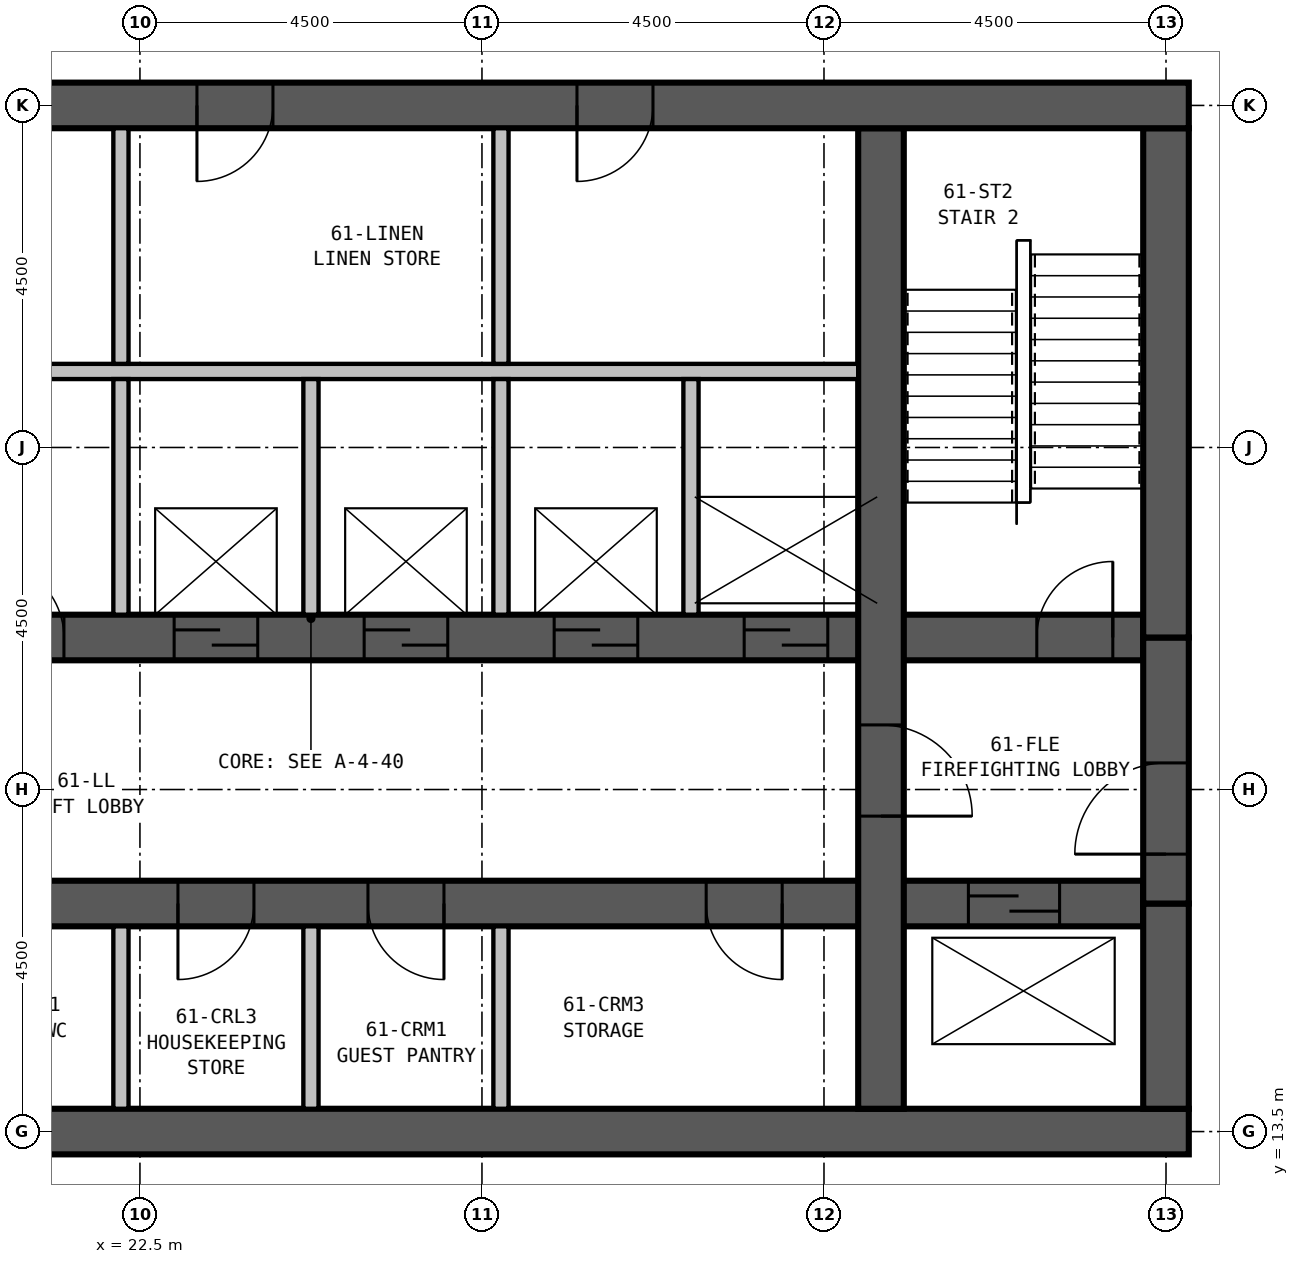
"""IFC4 building model, lengths in metres.
Left out: names, types, materials, properties, quantities, classifications, styles, units other than length and angle.
Written with IfcOpenShell. Run it as: python <this file> out.ifc"""

import sys

from ifc_helpers import new_model, si_unit, direction, frame, frame_2d, origin, place, context, subcontext, project, spatial, rectangle, extrude, element, fill, save


model = new_model("IFC4")
c1 = context("Model", 3, precision=1e-05, world=origin(), true_north=direction((0.0, 1.0)))
c2 = subcontext(c1, "Body", "Model", "MODEL_VIEW")
j1 = project(units=[si_unit("LENGTHUNIT", "METRE"), si_unit("PLANEANGLEUNIT", "RADIAN")], contexts=[c1])
p1 = place(None, origin())
s1 = spatial("IfcSite", under=j1, at=p1, CompositionType="ELEMENT")
p2 = place(p1, origin())
s2 = spatial("IfcBuilding", under=s1, at=p2, CompositionType="ELEMENT")
p3 = place(p2, frame((0.0, 0.0, 236.9)))
s3 = spatial("IfcBuildingStorey", under=s2, at=p3, CompositionType="ELEMENT", Elevation=236.9)
p4 = place(p3, frame((13.2, 13.5, 0.0), z_axis=(0.0, 0.0, 1.0), x_axis=(1.0, 0.0, 0.0)))
e1 = element("IfcWall", 1, at=p4, inside=s3, PredefinedType="SHEAR", context=c2, shape_type="SweptSolid", body=[
    extrude(rectangle(XDim=23.1, YDim=0.6, at=frame_2d((11.55, 0.0))), origin(), (0.0, 0.0, 1.0), 3.9),
])
p5 = place(p3, frame((36.3, 27.0, 0.0), z_axis=(0.0, 0.0, 1.0), x_axis=(-1.0, 0.0, 0.0)))
e2 = element("IfcWall", 2, at=p5, inside=s3, PredefinedType="SHEAR", context=c2, shape_type="SweptSolid", body=[
    extrude(rectangle(XDim=23.45, YDim=0.6, at=frame_2d((11.725, 0.0))), origin(), (0.0, 0.0, 1.0), 3.9),
])
p6 = place(p5, frame((17.05, 0.0, 0.0)))
e3 = element("IfcOpeningElement", 3, at=p6, cuts=e2, PredefinedType="OPENING", context=c2, shape_type="SweptSolid", body=[
    extrude(rectangle(XDim=1.0, YDim=2.1, at=frame_2d((0.5, 1.05))), frame((0.0, 0.31, 0.0), z_axis=(0.0, -1.0, 0.0), x_axis=(1.0, 0.0, 0.0)), (0.0, 0.0, 1.0), 0.62),
])
p7 = place(p5, frame((12.05, 0.0, 0.0)))
e4 = element("IfcOpeningElement", 4, at=p7, cuts=e2, PredefinedType="OPENING", context=c2, shape_type="SweptSolid", body=[
    extrude(rectangle(XDim=1.0, YDim=2.1, at=frame_2d((0.5, 1.05))), frame((0.0, 0.31, 0.0), z_axis=(0.0, -1.0, 0.0), x_axis=(1.0, 0.0, 0.0)), (0.0, 0.0, 1.0), 0.62),
])
p8 = place(p5, frame((7.05, 0.0, 0.0)))
e5 = element("IfcOpeningElement", 5, at=p8, cuts=e2, PredefinedType="OPENING", context=c2, shape_type="SweptSolid", body=[
    extrude(rectangle(XDim=1.0, YDim=2.1, at=frame_2d((0.5, 1.05))), frame((0.0, 0.31, 0.0), z_axis=(0.0, -1.0, 0.0), x_axis=(1.0, 0.0, 0.0)), (0.0, 0.0, 1.0), 0.62),
])
p9 = place(p3, frame((32.25, 13.8, 0.0), z_axis=(0.0, 0.0, 1.0), x_axis=(0.0, 1.0, 0.0)))
e6 = element("IfcWall", 6, at=p9, inside=s3, PredefinedType="SHEAR", context=c2, shape_type="SweptSolid", body=[
    extrude(rectangle(XDim=12.9, YDim=0.6, at=frame_2d((6.45, 0.0))), origin(), (0.0, 0.0, 1.0), 3.9),
])
p10 = place(p9, frame((5.05, 0.0, 0.0), z_axis=(0.0, 0.0, 1.0), x_axis=(-1.0, 0.0, 0.0)))
e7 = element("IfcOpeningElement", 7, at=p10, cuts=e6, PredefinedType="OPENING", context=c2, shape_type="SweptSolid", body=[
    extrude(rectangle(XDim=1.2, YDim=2.1, at=frame_2d((0.6, 1.05))), frame((0.0, 0.31, 0.0), z_axis=(0.0, -1.0, 0.0), x_axis=(1.0, 0.0, 0.0)), (0.0, 0.0, 1.0), 0.62),
])
p11 = place(p3, frame((13.8, 16.5, 0.0), z_axis=(0.0, 0.0, 1.0), x_axis=(1.0, 0.0, 0.0)))
e8 = element("IfcWall", 8, at=p11, inside=s3, PredefinedType="SHEAR", context=c2, shape_type="SweptSolid", body=[
    extrude(rectangle(XDim=21.9, YDim=0.6, at=frame_2d((10.95, 0.0))), origin(), (0.0, 0.0, 1.0), 3.9),
])
p12 = place(p11, frame((5.75, 0.0, 0.0), z_axis=(0.0, 0.0, 1.0), x_axis=(-1.0, 0.0, 0.0)))
e9 = element("IfcOpeningElement", 9, at=p12, cuts=e8, PredefinedType="OPENING", context=c2, shape_type="SweptSolid", body=[
    extrude(rectangle(XDim=1.0, YDim=2.1, at=frame_2d((0.5, 1.05))), frame((0.0, 0.31, 0.0), z_axis=(0.0, -1.0, 0.0), x_axis=(1.0, 0.0, 0.0)), (0.0, 0.0, 1.0), 0.62),
])
p13 = place(p11, frame((10.2, 0.0, 0.0), z_axis=(0.0, 0.0, 1.0), x_axis=(-1.0, 0.0, 0.0)))
e10 = element("IfcOpeningElement", 10, at=p13, cuts=e8, PredefinedType="OPENING", context=c2, shape_type="SweptSolid", body=[
    extrude(rectangle(XDim=1.0, YDim=2.1, at=frame_2d((0.5, 1.05))), frame((0.0, 0.31, 0.0), z_axis=(0.0, -1.0, 0.0), x_axis=(1.0, 0.0, 0.0)), (0.0, 0.0, 1.0), 0.62),
])
p14 = place(p11, frame((12.7, 0.0, 0.0), z_axis=(0.0, 0.0, 1.0), x_axis=(-1.0, 0.0, 0.0)))
e11 = element("IfcOpeningElement", 11, at=p14, cuts=e8, PredefinedType="OPENING", context=c2, shape_type="SweptSolid", body=[
    extrude(rectangle(XDim=1.0, YDim=2.1, at=frame_2d((0.5, 1.05))), frame((0.0, 0.31, 0.0), z_axis=(0.0, -1.0, 0.0), x_axis=(1.0, 0.0, 0.0)), (0.0, 0.0, 1.0), 0.62),
])
p15 = place(p11, frame((17.15, 0.0, 0.0), z_axis=(0.0, 0.0, 1.0), x_axis=(-1.0, 0.0, 0.0)))
e12 = element("IfcOpeningElement", 12, at=p15, cuts=e8, PredefinedType="OPENING", context=c2, shape_type="SweptSolid", body=[
    extrude(rectangle(XDim=1.0, YDim=2.1, at=frame_2d((0.5, 1.05))), frame((0.0, 0.31, 0.0), z_axis=(0.0, -1.0, 0.0), x_axis=(1.0, 0.0, 0.0)), (0.0, 0.0, 1.0), 0.62),
])
p16 = place(p11, frame((0.6, 0.0, 0.0)))
e13 = element("IfcOpeningElement", 13, at=p16, cuts=e8, PredefinedType="OPENING", context=c2, shape_type="SweptSolid", body=[
    extrude(rectangle(XDim=1.2, YDim=2.1, at=frame_2d((0.6, 1.05))), frame((0.0, 0.31, 0.0), z_axis=(0.0, -1.0, 0.0), x_axis=(1.0, 0.0, 0.0)), (0.0, 0.0, 1.0), 0.62),
])
p17 = place(p11, frame((19.6, 0.0, 0.0)))
e14 = element("IfcOpeningElement", 14, at=p17, cuts=e8, PredefinedType="OPENING", context=c2, shape_type="SweptSolid", body=[
    extrude(rectangle(XDim=1.2, YDim=2.1, at=frame_2d((0.6, 1.05))), frame((0.0, 0.31, 0.0), z_axis=(0.0, -1.0, 0.0), x_axis=(1.0, 0.0, 0.0)), (0.0, 0.0, 1.0), 0.62),
])
p18 = place(p3, frame((13.8, 20.0, 0.0), z_axis=(0.0, 0.0, 1.0), x_axis=(1.0, 0.0, 0.0)))
e15 = element("IfcWall", 15, at=p18, inside=s3, PredefinedType="SHEAR", context=c2, shape_type="SweptSolid", body=[
    extrude(rectangle(XDim=21.9, YDim=0.6, at=frame_2d((10.95, 0.0))), origin(), (0.0, 0.0, 1.0), 3.9),
])
p19 = place(p18, frame((0.5, 0.0, 0.0)))
e16 = element("IfcOpeningElement", 16, at=p19, cuts=e15, PredefinedType="OPENING", context=c2, shape_type="SweptSolid", body=[
    extrude(rectangle(XDim=1.0, YDim=2.1, at=frame_2d((0.5, 1.05))), frame((0.0, 0.31, 0.0), z_axis=(0.0, -1.0, 0.0), x_axis=(1.0, 0.0, 0.0)), (0.0, 0.0, 1.0), 0.62),
])
p20 = place(p18, frame((20.5, 0.0, 0.0)))
e17 = element("IfcOpeningElement", 17, at=p20, cuts=e15, PredefinedType="OPENING", context=c2, shape_type="SweptSolid", body=[
    extrude(rectangle(XDim=1.0, YDim=2.1, at=frame_2d((0.5, 1.05))), frame((0.0, 0.31, 0.0), z_axis=(0.0, -1.0, 0.0), x_axis=(1.0, 0.0, 0.0)), (0.0, 0.0, 1.0), 0.62),
])
p21 = place(p18, frame((9.15, 0.0, 0.0)))
e18 = element("IfcOpeningElement", 18, at=p21, cuts=e15, PredefinedType="OPENING", context=c2, shape_type="SweptSolid", body=[
    extrude(rectangle(XDim=1.1, YDim=2.1, at=frame_2d((0.55, 1.05))), frame((0.0, 0.31, 0.0), z_axis=(0.0, -1.0, 0.0), x_axis=(1.0, 0.0, 0.0)), (0.0, 0.0, 1.0), 0.62),
])
p22 = place(p18, frame((11.65, 0.0, 0.0)))
e19 = element("IfcOpeningElement", 19, at=p22, cuts=e15, PredefinedType="OPENING", context=c2, shape_type="SweptSolid", body=[
    extrude(rectangle(XDim=1.1, YDim=2.1, at=frame_2d((0.55, 1.05))), frame((0.0, 0.31, 0.0), z_axis=(0.0, -1.0, 0.0), x_axis=(1.0, 0.0, 0.0)), (0.0, 0.0, 1.0), 0.62),
])
p23 = place(p18, frame((14.15, 0.0, 0.0)))
e20 = element("IfcOpeningElement", 20, at=p23, cuts=e15, PredefinedType="OPENING", context=c2, shape_type="SweptSolid", body=[
    extrude(rectangle(XDim=1.1, YDim=2.1, at=frame_2d((0.55, 1.05))), frame((0.0, 0.31, 0.0), z_axis=(0.0, -1.0, 0.0), x_axis=(1.0, 0.0, 0.0)), (0.0, 0.0, 1.0), 0.62),
])
p24 = place(p18, frame((16.65, 0.0, 0.0)))
e21 = element("IfcOpeningElement", 21, at=p24, cuts=e15, PredefinedType="OPENING", context=c2, shape_type="SweptSolid", body=[
    extrude(rectangle(XDim=1.1, YDim=2.1, at=frame_2d((0.55, 1.05))), frame((0.0, 0.31, 0.0), z_axis=(0.0, -1.0, 0.0), x_axis=(1.0, 0.0, 0.0)), (0.0, 0.0, 1.0), 0.62),
])
p25 = place(p18, frame((5.75, 0.0, 0.0), z_axis=(0.0, 0.0, 1.0), x_axis=(-1.0, 0.0, 0.0)))
e22 = element("IfcOpeningElement", 22, at=p25, cuts=e15, PredefinedType="OPENING", context=c2, shape_type="SweptSolid", body=[
    extrude(rectangle(XDim=1.0, YDim=2.1, at=frame_2d((0.5, 1.05))), frame((0.0, 0.31, 0.0), z_axis=(0.0, -1.0, 0.0), x_axis=(1.0, 0.0, 0.0)), (0.0, 0.0, 1.0), 0.62),
])
p26 = place(p18, frame((6.7, 0.0, 0.0)))
e23 = element("IfcOpeningElement", 23, at=p26, cuts=e15, PredefinedType="OPENING", context=c2, shape_type="SweptSolid", body=[
    extrude(rectangle(XDim=1.0, YDim=2.1, at=frame_2d((0.5, 1.05))), frame((0.0, 0.31, 0.0), z_axis=(0.0, -1.0, 0.0), x_axis=(1.0, 0.0, 0.0)), (0.0, 0.0, 1.0), 0.62),
])
p27 = place(p3, frame((36.0, 13.8, 0.0), z_axis=(0.0, 0.0, 1.0), x_axis=(0.0, 1.0, 0.0)))
e24 = element("IfcWall", 24, at=p27, inside=s3, PredefinedType="SHEAR", context=c2, shape_type="SweptSolid", body=[
    extrude(rectangle(XDim=2.7, YDim=0.6, at=frame_2d((1.35, 0.0))), origin(), (0.0, 0.0, 1.0), 3.9),
])
p28 = place(p3, frame((36.0, 16.5, 0.0), z_axis=(0.0, 0.0, 1.0), x_axis=(0.0, 1.0, 0.0)))
e25 = element("IfcWall", 25, at=p28, inside=s3, PredefinedType="SHEAR", context=c2, shape_type="SweptSolid", body=[
    extrude(rectangle(XDim=3.5, YDim=0.6, at=frame_2d((1.75, 0.0))), origin(), (0.0, 0.0, 1.0), 3.9),
])
p29 = place(p28, frame((0.65, 0.0, 0.0)))
e26 = element("IfcOpeningElement", 26, at=p29, cuts=e25, PredefinedType="OPENING", context=c2, shape_type="SweptSolid", body=[
    extrude(rectangle(XDim=1.2, YDim=2.1, at=frame_2d((0.6, 1.05))), frame((0.0, 0.31, 0.0), z_axis=(0.0, -1.0, 0.0), x_axis=(1.0, 0.0, 0.0)), (0.0, 0.0, 1.0), 0.62),
])
p30 = place(p3, frame((36.0, 20.0, 0.0), z_axis=(0.0, 0.0, 1.0), x_axis=(0.0, 1.0, 0.0)))
e27 = element("IfcWall", 27, at=p30, inside=s3, PredefinedType="SHEAR", context=c2, shape_type="SweptSolid", body=[
    extrude(rectangle(XDim=6.7, YDim=0.6, at=frame_2d((3.35, 0.0))), origin(), (0.0, 0.0, 1.0), 3.9),
])
p31 = place(p3, frame((22.25, 13.8, 0.0), z_axis=(0.0, 0.0, 1.0), x_axis=(0.0, 1.0, 0.0)))
e28 = element("IfcWall", 28, at=p31, inside=s3, PredefinedType="PARTITIONING", context=c2, shape_type="SweptSolid", body=[
    extrude(rectangle(XDim=2.4, YDim=0.2, at=frame_2d((1.2, 0.0))), origin(), (0.0, 0.0, 1.0), 3.65),
])
p32 = place(p3, frame((22.25, 20.3, 0.0), z_axis=(0.0, 0.0, 1.0), x_axis=(0.0, 1.0, 0.0)))
e29 = element("IfcWall", 29, at=p32, inside=s3, PredefinedType="PARTITIONING", context=c2, shape_type="SweptSolid", body=[
    extrude(rectangle(XDim=3.1, YDim=0.2, at=frame_2d((1.55, 0.0))), origin(), (0.0, 0.0, 1.0), 3.65),
])
p33 = place(p3, frame((24.75, 13.8, 0.0), z_axis=(0.0, 0.0, 1.0), x_axis=(0.0, 1.0, 0.0)))
e30 = element("IfcWall", 30, at=p33, inside=s3, PredefinedType="PARTITIONING", context=c2, shape_type="SweptSolid", body=[
    extrude(rectangle(XDim=2.4, YDim=0.2, at=frame_2d((1.2, 0.0))), origin(), (0.0, 0.0, 1.0), 3.65),
])
p34 = place(p3, frame((24.75, 20.3, 0.0), z_axis=(0.0, 0.0, 1.0), x_axis=(0.0, 1.0, 0.0)))
e31 = element("IfcWall", 31, at=p34, inside=s3, PredefinedType="PARTITIONING", context=c2, shape_type="SweptSolid", body=[
    extrude(rectangle(XDim=3.1, YDim=0.2, at=frame_2d((1.55, 0.0))), origin(), (0.0, 0.0, 1.0), 3.65),
])
p35 = place(p3, frame((27.25, 13.8, 0.0), z_axis=(0.0, 0.0, 1.0), x_axis=(0.0, 1.0, 0.0)))
e32 = element("IfcWall", 32, at=p35, inside=s3, PredefinedType="PARTITIONING", context=c2, shape_type="SweptSolid", body=[
    extrude(rectangle(XDim=2.4, YDim=0.2, at=frame_2d((1.2, 0.0))), origin(), (0.0, 0.0, 1.0), 3.65),
])
for number, where, z_axis, x_axis in (
    (33, (27.25, 20.3, 0.0), (0.0, 0.0, 1.0), (0.0, 1.0, 0.0)),
    (34, (29.75, 20.3, 0.0), (0.0, 0.0, 1.0), (0.0, 1.0, 0.0)),
):
    element("IfcWall", number, at=place(p3, frame(where, z_axis=z_axis, x_axis=x_axis)), inside=s3, PredefinedType="PARTITIONING", context=c2, shape_type="SweptSolid", body=[
        extrude(rectangle(XDim=3.1, YDim=0.2, at=frame_2d((1.55, 0.0))), origin(), (0.0, 0.0, 1.0), 3.65),
    ])
p36 = place(p3, frame((17.55, 23.5, 0.0), z_axis=(0.0, 0.0, 1.0), x_axis=(1.0, 0.0, 0.0)))
e35 = element("IfcWall", 35, at=p36, inside=s3, PredefinedType="PARTITIONING", context=c2, shape_type="SweptSolid", body=[
    extrude(rectangle(XDim=14.4, YDim=0.2, at=frame_2d((7.2, 0.0))), origin(), (0.0, 0.0, 1.0), 3.65),
])
p37 = place(p36, frame((0.45, 0.0, 0.0)))
e36 = element("IfcOpeningElement", 36, at=p37, cuts=e35, PredefinedType="OPENING", context=c2, shape_type="SweptSolid", body=[
    extrude(rectangle(XDim=1.0, YDim=2.1, at=frame_2d((0.5, 1.05))), frame((0.0, 0.11, 0.0), z_axis=(0.0, -1.0, 0.0), x_axis=(1.0, 0.0, 0.0)), (0.0, 0.0, 1.0), 0.22),
])
for number, where, z_axis, x_axis in (
    (37, (22.25, 23.6, 0.0), (0.0, 0.0, 1.0), (0.0, 1.0, 0.0)),
    (38, (27.25, 23.6, 0.0), (0.0, 0.0, 1.0), (0.0, 1.0, 0.0)),
):
    element("IfcWall", number, at=place(p3, frame(where, z_axis=z_axis, x_axis=x_axis)), inside=s3, PredefinedType="PARTITIONING", context=c2, shape_type="SweptSolid", body=[
        extrude(rectangle(XDim=3.1, YDim=0.2, at=frame_2d((1.55, 0.0))), origin(), (0.0, 0.0, 1.0), 3.65),
    ])
p38 = place(p29, origin())
e39 = element("IfcDoor", 39, at=p38, inside=s3, OperationType="SINGLE_SWING_LEFT", PredefinedType="DOOR", context=c2, shape_type="SweptSolid", body=[
    extrude(rectangle(XDim=1.2, YDim=2.1, at=frame_2d((0.6, 1.05))), frame((0.0, 0.3, 0.0), z_axis=(0.0, -1.0, 0.0), x_axis=(1.0, 0.0, 0.0)), (0.0, 0.0, 1.0), 0.6),
])
fill(e26, e39)
p39 = place(p10, origin())
e40 = element("IfcDoor", 40, at=p39, inside=s3, OperationType="SINGLE_SWING_RIGHT", PredefinedType="DOOR", context=c2, shape_type="SweptSolid", body=[
    extrude(rectangle(XDim=1.2, YDim=2.1, at=frame_2d((0.6, 1.05))), frame((0.0, 0.3, 0.0), z_axis=(0.0, -1.0, 0.0), x_axis=(1.0, 0.0, 0.0)), (0.0, 0.0, 1.0), 0.6),
])
fill(e7, e40)
p40 = place(p20, origin())
e41 = element("IfcDoor", 41, at=p40, inside=s3, OperationType="SINGLE_SWING_RIGHT", PredefinedType="DOOR", context=c2, shape_type="SweptSolid", body=[
    extrude(rectangle(XDim=1.0, YDim=2.1, at=frame_2d((0.5, 1.05))), frame((0.0, 0.3, 0.0), z_axis=(0.0, -1.0, 0.0), x_axis=(1.0, 0.0, 0.0)), (0.0, 0.0, 1.0), 0.6),
])
fill(e17, e41)
p41 = place(p21, origin())
e42 = element("IfcDoor", 42, at=p41, inside=s3, OperationType="SLIDING_TO_LEFT", PredefinedType="DOOR", context=c2, shape_type="SweptSolid", body=[
    extrude(rectangle(XDim=1.1, YDim=2.1, at=frame_2d((0.55, 1.05))), frame((0.0, 0.3, 0.0), z_axis=(0.0, -1.0, 0.0), x_axis=(1.0, 0.0, 0.0)), (0.0, 0.0, 1.0), 0.6),
])
fill(e18, e42)
p42 = place(p22, origin())
e43 = element("IfcDoor", 43, at=p42, inside=s3, OperationType="SLIDING_TO_LEFT", PredefinedType="DOOR", context=c2, shape_type="SweptSolid", body=[
    extrude(rectangle(XDim=1.1, YDim=2.1, at=frame_2d((0.55, 1.05))), frame((0.0, 0.3, 0.0), z_axis=(0.0, -1.0, 0.0), x_axis=(1.0, 0.0, 0.0)), (0.0, 0.0, 1.0), 0.6),
])
fill(e19, e43)
p43 = place(p23, origin())
e44 = element("IfcDoor", 44, at=p43, inside=s3, OperationType="SLIDING_TO_LEFT", PredefinedType="DOOR", context=c2, shape_type="SweptSolid", body=[
    extrude(rectangle(XDim=1.1, YDim=2.1, at=frame_2d((0.55, 1.05))), frame((0.0, 0.3, 0.0), z_axis=(0.0, -1.0, 0.0), x_axis=(1.0, 0.0, 0.0)), (0.0, 0.0, 1.0), 0.6),
])
fill(e20, e44)
p44 = place(p24, origin())
e45 = element("IfcDoor", 45, at=p44, inside=s3, OperationType="SLIDING_TO_LEFT", PredefinedType="DOOR", context=c2, shape_type="SweptSolid", body=[
    extrude(rectangle(XDim=1.1, YDim=2.1, at=frame_2d((0.55, 1.05))), frame((0.0, 0.3, 0.0), z_axis=(0.0, -1.0, 0.0), x_axis=(1.0, 0.0, 0.0)), (0.0, 0.0, 1.0), 0.6),
])
fill(e21, e45)
p45 = place(p13, origin())
e46 = element("IfcDoor", 46, at=p45, inside=s3, OperationType="SINGLE_SWING_RIGHT", PredefinedType="DOOR", context=c2, shape_type="SweptSolid", body=[
    extrude(rectangle(XDim=1.0, YDim=2.1, at=frame_2d((0.5, 1.05))), frame((0.0, 0.3, 0.0), z_axis=(0.0, -1.0, 0.0), x_axis=(1.0, 0.0, 0.0)), (0.0, 0.0, 1.0), 0.6),
])
fill(e10, e46)
p46 = place(p14, origin())
e47 = element("IfcDoor", 47, at=p46, inside=s3, OperationType="SINGLE_SWING_LEFT", PredefinedType="DOOR", context=c2, shape_type="SweptSolid", body=[
    extrude(rectangle(XDim=1.0, YDim=2.1, at=frame_2d((0.5, 1.05))), frame((0.0, 0.3, 0.0), z_axis=(0.0, -1.0, 0.0), x_axis=(1.0, 0.0, 0.0)), (0.0, 0.0, 1.0), 0.6),
])
fill(e11, e47)
p47 = place(p15, origin())
e48 = element("IfcDoor", 48, at=p47, inside=s3, OperationType="SINGLE_SWING_LEFT", PredefinedType="DOOR", context=c2, shape_type="SweptSolid", body=[
    extrude(rectangle(XDim=1.0, YDim=2.1, at=frame_2d((0.5, 1.05))), frame((0.0, 0.3, 0.0), z_axis=(0.0, -1.0, 0.0), x_axis=(1.0, 0.0, 0.0)), (0.0, 0.0, 1.0), 0.6),
])
fill(e12, e48)
p48 = place(p26, origin())
e49 = element("IfcDoor", 49, at=p48, inside=s3, OperationType="SINGLE_SWING_LEFT", PredefinedType="DOOR", context=c2, shape_type="SweptSolid", body=[
    extrude(rectangle(XDim=1.0, YDim=2.1, at=frame_2d((0.5, 1.05))), frame((0.0, 0.3, 0.0), z_axis=(0.0, -1.0, 0.0), x_axis=(1.0, 0.0, 0.0)), (0.0, 0.0, 1.0), 0.6),
])
fill(e23, e49)
p49 = place(p17, origin())
e50 = element("IfcDoor", 50, at=p49, inside=s3, OperationType="SLIDING_TO_LEFT", PredefinedType="DOOR", context=c2, shape_type="SweptSolid", body=[
    extrude(rectangle(XDim=1.2, YDim=2.1, at=frame_2d((0.6, 1.05))), frame((0.0, 0.3, 0.0), z_axis=(0.0, -1.0, 0.0), x_axis=(1.0, 0.0, 0.0)), (0.0, 0.0, 1.0), 0.6),
])
fill(e14, e50)
p50 = place(p7, origin())
e51 = element("IfcDoor", 51, at=p50, inside=s3, OperationType="SINGLE_SWING_RIGHT", PredefinedType="DOOR", context=c2, shape_type="SweptSolid", body=[
    extrude(rectangle(XDim=1.0, YDim=2.1, at=frame_2d((0.5, 1.05))), frame((0.0, 0.3, 0.0), z_axis=(0.0, -1.0, 0.0), x_axis=(1.0, 0.0, 0.0)), (0.0, 0.0, 1.0), 0.6),
])
fill(e4, e51)
p51 = place(p8, origin())
e52 = element("IfcDoor", 52, at=p51, inside=s3, OperationType="SINGLE_SWING_RIGHT", PredefinedType="DOOR", context=c2, shape_type="SweptSolid", body=[
    extrude(rectangle(XDim=1.0, YDim=2.1, at=frame_2d((0.5, 1.05))), frame((0.0, 0.3, 0.0), z_axis=(0.0, -1.0, 0.0), x_axis=(1.0, 0.0, 0.0)), (0.0, 0.0, 1.0), 0.6),
])
fill(e5, e52)
save(model, sys.argv[1])
